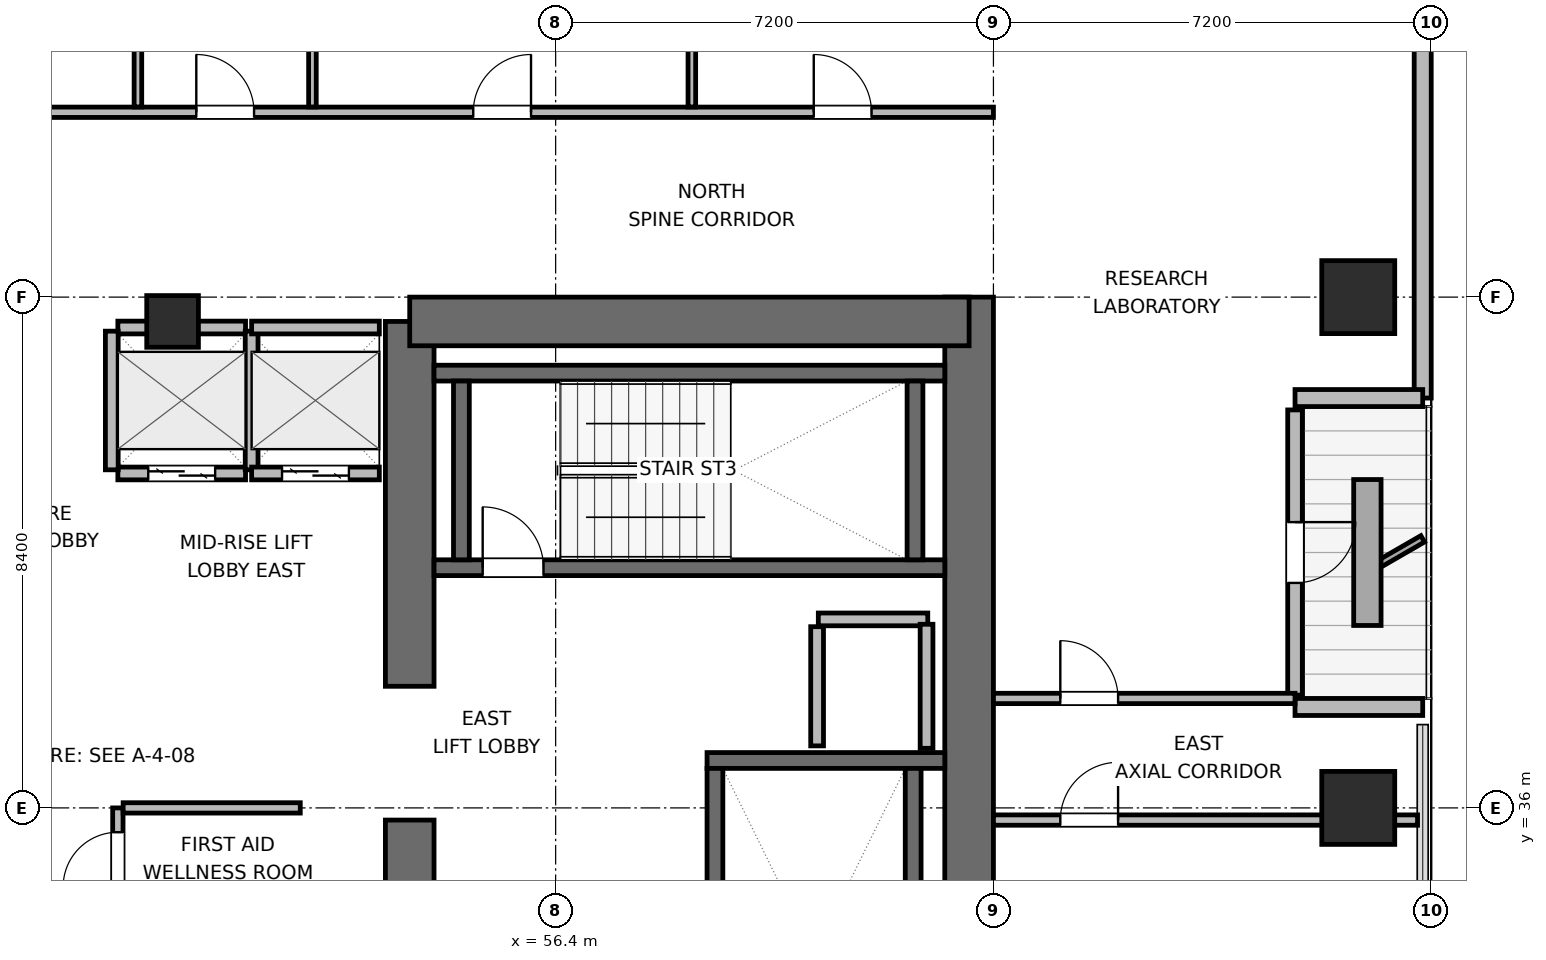
"""IFC4 building model, lengths in metres.
Left out: names, types, materials, properties, quantities, classifications, styles, units other than length and angle.
Written with IfcOpenShell. Run it as: python <this file> out.ifc"""

import sys

from ifc_helpers import new_model, si_unit, direction, frame, frame_2d, origin, origin_2d, place, context, subcontext, project, spatial, rectangle, extrude, element, fill, save


model = new_model("IFC4")
c1 = context("Model", 3, precision=1e-05, world=origin(), true_north=direction((0.0, 1.0)))
c2 = subcontext(c1, "Body", "Model", "MODEL_VIEW")
j1 = project(units=[si_unit("LENGTHUNIT", "METRE"), si_unit("PLANEANGLEUNIT", "RADIAN")], contexts=[c1])
p1 = place(None, origin())
s1 = spatial("IfcSite", under=j1, at=p1, CompositionType="ELEMENT")
p2 = place(p1, origin())
s2 = spatial("IfcBuilding", under=s1, at=p2, CompositionType="ELEMENT")
p3 = place(p2, frame((0.0, 0.0, 174.0)))
s3 = spatial("IfcBuildingStorey", under=s2, at=p3, CompositionType="ELEMENT", Elevation=174.0)
p4 = place(p3, frame((54.0, 28.0, 0.0), z_axis=(0.0, 0.0, 1.0), x_axis=(0.0, 1.0, 0.0)))
e1 = element("IfcWall", 1, at=p4, inside=s3, PredefinedType="SHEAR", context=c2, shape_type="SweptSolid", body=[
    extrude(rectangle(XDim=7.8, YDim=0.8, at=frame_2d((3.9, 0.0))), origin(), (0.0, 0.0, 1.0), 3.9),
])
p5 = place(p3, frame((54.0, 38.0, 0.0), z_axis=(0.0, 0.0, 1.0), x_axis=(0.0, 1.0, 0.0)))
e2 = element("IfcWall", 2, at=p5, inside=s3, PredefinedType="SHEAR", context=c2, shape_type="SweptSolid", body=[
    extrude(rectangle(XDim=6.0, YDim=0.8, at=frame_2d((3.0, 0.0))), origin(), (0.0, 0.0, 1.0), 3.9),
])
p6 = place(p3, frame((63.2, 27.6, 0.0), z_axis=(0.0, 0.0, 1.0), x_axis=(0.0, 1.0, 0.0)))
e3 = element("IfcWall", 3, at=p6, inside=s3, PredefinedType="SHEAR", context=c2, shape_type="SweptSolid", body=[
    extrude(rectangle(XDim=16.8, YDim=0.8, at=frame_2d((8.4, 0.0))), origin(), (0.0, 0.0, 1.0), 3.9),
])
p7 = place(p3, frame((54.0, 44.0, 0.0), z_axis=(0.0, 0.0, 1.0), x_axis=(1.0, 0.0, 0.0)))
e4 = element("IfcWall", 4, at=p7, inside=s3, PredefinedType="SHEAR", context=c2, shape_type="SweptSolid", body=[
    extrude(rectangle(XDim=9.2, YDim=0.8, at=frame_2d((4.6, 0.0))), origin(), (0.0, 0.0, 1.0), 3.9),
])
p8 = place(p3, frame((58.89, 36.78, 0.0), z_axis=(0.0, 0.0, 1.0), x_axis=(1.0, 0.0, 0.0)))
e5 = element("IfcWall", 5, at=p8, inside=s3, PredefinedType="SHEAR", context=c2, shape_type="SweptSolid", body=[
    extrude(rectangle(XDim=3.91, YDim=0.26, at=frame_2d((1.955, 0.0))), origin(), (0.0, 0.0, 1.0), 3.9),
])
p9 = place(p3, frame((59.02, 29.05, 0.0), z_axis=(0.0, 0.0, 1.0), x_axis=(0.0, 1.0, 0.0)))
e6 = element("IfcWall", 6, at=p9, inside=s3, PredefinedType="SHEAR", context=c2, shape_type="SweptSolid", body=[
    extrude(rectangle(XDim=7.6, YDim=0.26, at=frame_2d((3.8, 0.0))), origin(), (0.0, 0.0, 1.0), 3.9),
])
p10 = place(p9, frame((0.3, 0.0, 0.0)))
e7 = element("IfcOpeningElement", 7, at=p10, cuts=e6, PredefinedType="OPENING", context=c2, shape_type="SweptSolid", body=[
    extrude(rectangle(XDim=1.0, YDim=2.04, at=frame_2d((0.5, 1.02))), frame((0.0, 0.14, 0.0), z_axis=(0.0, -1.0, 0.0), x_axis=(1.0, 0.0, 0.0)), (0.0, 0.0, 1.0), 0.28),
])
p11 = place(p3, frame((62.28, 29.05, 0.0), z_axis=(0.0, 0.0, 1.0), x_axis=(0.0, 1.0, 0.0)))
e8 = element("IfcWall", 8, at=p11, inside=s3, PredefinedType="SHEAR", context=c2, shape_type="SweptSolid", body=[
    extrude(rectangle(XDim=7.6, YDim=0.26, at=frame_2d((3.8, 0.0))), origin(), (0.0, 0.0, 1.0), 3.9),
])
p12 = place(p3, frame((54.4, 39.95, 0.0), z_axis=(0.0, 0.0, 1.0), x_axis=(1.0, 0.0, 0.0)))
e9 = element("IfcWall", 9, at=p12, inside=s3, PredefinedType="SHEAR", context=c2, shape_type="SweptSolid", body=[
    extrude(rectangle(XDim=8.4, YDim=0.26, at=frame_2d((4.2, 0.0))), origin(), (0.0, 0.0, 1.0), 3.9),
])
p13 = place(p12, frame((0.8, 0.0, 0.0)))
e10 = element("IfcOpeningElement", 10, at=p13, cuts=e9, PredefinedType="OPENING", context=c2, shape_type="SweptSolid", body=[
    extrude(rectangle(XDim=1.0, YDim=2.04, at=frame_2d((0.5, 1.02))), frame((0.0, 0.14, 0.0), z_axis=(0.0, -1.0, 0.0), x_axis=(1.0, 0.0, 0.0)), (0.0, 0.0, 1.0), 0.28),
])
p14 = place(p3, frame((54.4, 43.15, 0.0), z_axis=(0.0, 0.0, 1.0), x_axis=(1.0, 0.0, 0.0)))
e11 = element("IfcWall", 11, at=p14, inside=s3, PredefinedType="SHEAR", context=c2, shape_type="SweptSolid", body=[
    extrude(rectangle(XDim=8.4, YDim=0.26, at=frame_2d((4.2, 0.0))), origin(), (0.0, 0.0, 1.0), 3.9),
])
for number, where, z_axis, x_axis in (
    (12, (54.85, 40.08, 0.0), (0.0, 0.0, 1.0), (0.0, 1.0, 0.0)),
    (13, (62.31, 40.08, 0.0), (0.0, 0.0, 1.0), (0.0, 1.0, 0.0)),
):
    element("IfcWall", number, at=place(p3, frame(where, z_axis=z_axis, x_axis=x_axis)), inside=s3, PredefinedType="SHEAR", context=c2, shape_type="SweptSolid", body=[
        extrude(rectangle(XDim=2.94, YDim=0.26, at=frame_2d((1.47, 0.0))), origin(), (0.0, 0.0, 1.0), 3.9),
    ])
for number, where, z_axis, x_axis in (
    (14, (69.6, 36.0, 0.0), (0.0, 0.0, 1.0), (1.0, 0.0, 0.0)),
    (15, (69.6, 44.4, 0.0), (0.0, 0.0, 1.0), (1.0, 0.0, 0.0)),
):
    element("IfcColumn", number, at=place(p3, frame(where, z_axis=z_axis, x_axis=x_axis)), inside=s3, PredefinedType="COLUMN", context=c2, shape_type="SweptSolid", body=[
        extrude(rectangle(XDim=1.2, YDim=1.2, at=origin_2d()), origin(), (0.0, 0.0, 1.0), 3.9),
    ])
p15 = place(p3, frame((50.1, 44.0, 0.0), z_axis=(0.0, 0.0, 1.0), x_axis=(1.0, 0.0, 0.0)))
e16 = element("IfcColumn", 16, at=p15, inside=s3, PredefinedType="COLUMN", context=c2, shape_type="SweptSolid", body=[
    extrude(rectangle(XDim=0.85, YDim=0.85, at=origin_2d()), origin(), (0.0, 0.0, 1.0), 3.9),
])
p16 = place(p3, frame((70.66, 56.982, 0.0), z_axis=(0.0, 0.0, 1.0), x_axis=(0.0, -1.0, 0.0)))
e17 = element("IfcWall", 17, at=p16, inside=s3, PredefinedType="SOLIDWALL", context=c2, shape_type="SweptSolid", body=[
    extrude(rectangle(XDim=14.242, YDim=0.28, at=frame_2d((7.121, 0.0))), origin(), (0.0, 0.0, 1.0), 3.68),
])
p17 = place(p3, frame((70.66, 42.74, 0.0), z_axis=(0.0, 0.0, 1.0), x_axis=(-1.0, 0.0, 0.0)))
e18 = element("IfcWall", 18, at=p17, inside=s3, PredefinedType="SOLIDWALL", context=c2, shape_type="SweptSolid", body=[
    extrude(rectangle(XDim=2.1, YDim=0.28, at=frame_2d((1.05, 0.0))), origin(), (0.0, 0.0, 1.0), 3.116),
])
p18 = place(p3, frame((68.56, 42.545, 0.0), z_axis=(0.0, 0.0, 1.0), x_axis=(0.0, -1.0, 0.0)))
e19 = element("IfcWall", 19, at=p18, inside=s3, PredefinedType="SOLIDWALL", context=c2, shape_type="SweptSolid", body=[
    extrude(rectangle(XDim=4.69, YDim=0.24, at=frame_2d((2.345, 0.0))), origin(), (0.0, 0.0, 1.0), 3.248),
])
p19 = place(p18, frame((1.845, 0.0, 0.0)))
e20 = element("IfcOpeningElement", 20, at=p19, cuts=e19, PredefinedType="OPENING", context=c2, shape_type="SweptSolid", body=[
    extrude(rectangle(XDim=1.0, YDim=2.02, at=frame_2d((0.5, 1.01))), frame((0.0, 0.13, 0.0), z_axis=(0.0, -1.0, 0.0), x_axis=(1.0, 0.0, 0.0)), (0.0, 0.0, 1.0), 0.26),
])
p20 = place(p3, frame((68.56, 37.66, 0.0), z_axis=(0.0, 0.0, 1.0), x_axis=(1.0, 0.0, 0.0)))
e21 = element("IfcWall", 21, at=p20, inside=s3, PredefinedType="SOLIDWALL", context=c2, shape_type="SweptSolid", body=[
    extrude(rectangle(XDim=2.1, YDim=0.28, at=frame_2d((1.05, 0.0))), origin(), (0.0, 0.0, 1.0), 3.116),
])
p21 = place(p3, frame((60.72, 39.1, 0.0), z_axis=(0.0, 0.0, 1.0), x_axis=(1.0, 0.0, 0.0)))
e22 = element("IfcWall", 22, at=p21, inside=s3, PredefinedType="PARTITIONING", context=c2, shape_type="SweptSolid", body=[
    extrude(rectangle(XDim=1.8, YDim=0.21, at=frame_2d((0.9, 0.0))), origin(), (0.0, 0.0, 1.0), 3.68),
])
p22 = place(p3, frame((60.7, 37.02, 0.0), z_axis=(0.0, 0.0, 1.0), x_axis=(0.0, 1.0, 0.0)))
e23 = element("IfcWall", 23, at=p22, inside=s3, PredefinedType="PARTITIONING", context=c2, shape_type="SweptSolid", body=[
    extrude(rectangle(XDim=1.96, YDim=0.21, at=frame_2d((0.98, 0.0))), origin(), (0.0, 0.0, 1.0), 3.68),
])
p23 = place(p3, frame((62.5, 36.98, 0.0), z_axis=(0.0, 0.0, 1.0), x_axis=(0.0, 1.0, 0.0)))
e24 = element("IfcWall", 24, at=p23, inside=s3, PredefinedType="PARTITIONING", context=c2, shape_type="SweptSolid", body=[
    extrude(rectangle(XDim=2.04, YDim=0.21, at=frame_2d((1.02, 0.0))), origin(), (0.0, 0.0, 1.0), 3.68),
])
p24 = place(p3, frame((49.2, 41.5, 0.0), z_axis=(0.0, 0.0, 1.0), x_axis=(1.0, 0.0, 0.0)))
e25 = element("IfcWall", 25, at=p24, inside=s3, PredefinedType="PARTITIONING", context=c2, shape_type="SweptSolid", body=[
    extrude(rectangle(XDim=2.1, YDim=0.21, at=frame_2d((1.05, 0.0))), origin(), (0.0, 0.0, 1.0), 3.68),
])
p25 = place(p24, frame((0.5, 0.0, 0.0)))
e26 = element("IfcOpeningElement", 26, at=p25, cuts=e25, PredefinedType="OPENING", context=c2, shape_type="SweptSolid", body=[
    extrude(rectangle(XDim=1.1, YDim=2.04, at=frame_2d((0.55, 1.02))), frame((0.0, 0.115, 0.0), z_axis=(0.0, -1.0, 0.0), x_axis=(1.0, 0.0, 0.0)), (0.0, 0.0, 1.0), 0.23),
])
p26 = place(p3, frame((49.2, 43.9, 0.0), z_axis=(0.0, 0.0, 1.0), x_axis=(1.0, 0.0, 0.0)))
e27 = element("IfcWall", 27, at=p26, inside=s3, PredefinedType="PARTITIONING", context=c2, shape_type="SweptSolid", body=[
    extrude(rectangle(XDim=2.1, YDim=0.21, at=frame_2d((1.05, 0.0))), origin(), (0.0, 0.0, 1.0), 2.765),
])
for number, where, z_axis, x_axis in (
    (28, (49.1, 41.56, 0.0), (0.0, 0.0, 1.0), (0.0, 1.0, 0.0)),
    (29, (51.4, 41.56, 0.0), (0.0, 0.0, 1.0), (0.0, 1.0, 0.0)),
):
    element("IfcWall", number, at=place(p3, frame(where, z_axis=z_axis, x_axis=x_axis)), inside=s3, PredefinedType="PARTITIONING", context=c2, shape_type="SweptSolid", body=[
        extrude(rectangle(XDim=2.28, YDim=0.21, at=frame_2d((1.14, 0.0))), origin(), (0.0, 0.0, 1.0), 3.68),
    ])
p27 = place(p3, frame((51.4, 41.5, 0.0), z_axis=(0.0, 0.0, 1.0), x_axis=(1.0, 0.0, 0.0)))
e30 = element("IfcWall", 30, at=p27, inside=s3, PredefinedType="PARTITIONING", context=c2, shape_type="SweptSolid", body=[
    extrude(rectangle(XDim=2.1, YDim=0.21, at=frame_2d((1.05, 0.0))), origin(), (0.0, 0.0, 1.0), 3.68),
])
p28 = place(p27, frame((0.5, 0.0, 0.0)))
e31 = element("IfcOpeningElement", 31, at=p28, cuts=e30, PredefinedType="OPENING", context=c2, shape_type="SweptSolid", body=[
    extrude(rectangle(XDim=1.1, YDim=2.04, at=frame_2d((0.55, 1.02))), frame((0.0, 0.115, 0.0), z_axis=(0.0, -1.0, 0.0), x_axis=(1.0, 0.0, 0.0)), (0.0, 0.0, 1.0), 0.23),
])
p29 = place(p3, frame((51.4, 43.9, 0.0), z_axis=(0.0, 0.0, 1.0), x_axis=(1.0, 0.0, 0.0)))
e32 = element("IfcWall", 32, at=p29, inside=s3, PredefinedType="PARTITIONING", context=c2, shape_type="SweptSolid", body=[
    extrude(rectangle(XDim=2.1, YDim=0.21, at=frame_2d((1.05, 0.0))), origin(), (0.0, 0.0, 1.0), 2.765),
])
p30 = place(p3, frame((49.2, 32.6, 0.0), z_axis=(0.0, 0.0, 1.0), x_axis=(0.0, 1.0, 0.0)))
e33 = element("IfcWall", 33, at=p30, inside=s3, PredefinedType="PARTITIONING", context=c2, shape_type="SweptSolid", body=[
    extrude(rectangle(XDim=3.4, YDim=0.17, at=frame_2d((1.7, 0.0))), origin(), (0.0, 0.0, 1.0), 3.68),
])
p31 = place(p30, frame((0.4, 0.0, 0.0)))
e34 = element("IfcOpeningElement", 34, at=p31, cuts=e33, PredefinedType="OPENING", context=c2, shape_type="SweptSolid", body=[
    extrude(rectangle(XDim=0.9, YDim=2.02, at=frame_2d((0.45, 1.01))), frame((0.0, 0.095, 0.0), z_axis=(0.0, -1.0, 0.0), x_axis=(1.0, 0.0, 0.0)), (0.0, 0.0, 1.0), 0.19),
])
p32 = place(p30, frame((2.1, 0.0, 0.0)))
e35 = element("IfcOpeningElement", 35, at=p32, cuts=e33, PredefinedType="OPENING", context=c2, shape_type="SweptSolid", body=[
    extrude(rectangle(XDim=0.9, YDim=2.02, at=frame_2d((0.45, 1.01))), frame((0.0, 0.095, 0.0), z_axis=(0.0, -1.0, 0.0), x_axis=(1.0, 0.0, 0.0)), (0.0, 0.0, 1.0), 0.19),
])
p33 = place(p3, frame((49.287, 36.0, 0.0), z_axis=(0.0, 0.0, 1.0), x_axis=(1.0, 0.0, 0.0)))
e36 = element("IfcWall", 36, at=p33, inside=s3, PredefinedType="PARTITIONING", context=c2, shape_type="SweptSolid", body=[
    extrude(rectangle(XDim=2.913, YDim=0.17, at=frame_2d((1.457, 0.0))), origin(), (0.0, 0.0, 1.0), 3.68),
])
p34 = place(p3, frame((29.525, 47.44, 0.0), z_axis=(0.0, 0.0, 1.0), x_axis=(1.0, 0.0, 0.0)))
e37 = element("IfcWall", 37, at=p34, inside=s3, PredefinedType="PARTITIONING", context=c2, shape_type="SweptSolid", body=[
    extrude(rectangle(XDim=34.075, YDim=0.17, at=frame_2d((17.038, 0.0))), origin(), (0.0, 0.0, 1.0), 3.68),
])
p35 = place(p34, frame((1.217, 0.0, 0.0)))
e38 = element("IfcOpeningElement", 38, at=p35, cuts=e37, PredefinedType="OPENING", context=c2, shape_type="SweptSolid", body=[
    extrude(rectangle(XDim=0.95, YDim=2.04, at=frame_2d((0.475, 1.02))), frame((0.0, 0.095, 0.0), z_axis=(0.0, -1.0, 0.0), x_axis=(1.0, 0.0, 0.0)), (0.0, 0.0, 1.0), 0.19),
])
p36 = place(p34, frame((6.37, 0.0, 0.0)))
e39 = element("IfcOpeningElement", 39, at=p36, cuts=e37, PredefinedType="OPENING", context=c2, shape_type="SweptSolid", body=[
    extrude(rectangle(XDim=0.95, YDim=2.04, at=frame_2d((0.475, 1.02))), frame((0.0, 0.095, 0.0), z_axis=(0.0, -1.0, 0.0), x_axis=(1.0, 0.0, 0.0)), (0.0, 0.0, 1.0), 0.19),
])
p37 = place(p34, frame((12.01, 0.0, 0.0)))
e40 = element("IfcOpeningElement", 40, at=p37, cuts=e37, PredefinedType="OPENING", context=c2, shape_type="SweptSolid", body=[
    extrude(rectangle(XDim=0.95, YDim=2.04, at=frame_2d((0.475, 1.02))), frame((0.0, 0.095, 0.0), z_axis=(0.0, -1.0, 0.0), x_axis=(1.0, 0.0, 0.0)), (0.0, 0.0, 1.0), 0.19),
])
p38 = place(p34, frame((16.86, 0.0, 0.0)))
e41 = element("IfcOpeningElement", 41, at=p38, cuts=e37, PredefinedType="OPENING", context=c2, shape_type="SweptSolid", body=[
    extrude(rectangle(XDim=0.95, YDim=2.04, at=frame_2d((0.475, 1.02))), frame((0.0, 0.095, 0.0), z_axis=(0.0, -1.0, 0.0), x_axis=(1.0, 0.0, 0.0)), (0.0, 0.0, 1.0), 0.19),
])
p39 = place(p34, frame((20.965, 0.0, 0.0)))
e42 = element("IfcOpeningElement", 42, at=p39, cuts=e37, PredefinedType="OPENING", context=c2, shape_type="SweptSolid", body=[
    extrude(rectangle(XDim=0.95, YDim=2.04, at=frame_2d((0.475, 1.02))), frame((0.0, 0.095, 0.0), z_axis=(0.0, -1.0, 0.0), x_axis=(1.0, 0.0, 0.0)), (0.0, 0.0, 1.0), 0.19),
])
p40 = place(p34, frame((25.52, 0.0, 0.0)))
e43 = element("IfcOpeningElement", 43, at=p40, cuts=e37, PredefinedType="OPENING", context=c2, shape_type="SweptSolid", body=[
    extrude(rectangle(XDim=0.95, YDim=2.04, at=frame_2d((0.475, 1.02))), frame((0.0, 0.095, 0.0), z_axis=(0.0, -1.0, 0.0), x_axis=(1.0, 0.0, 0.0)), (0.0, 0.0, 1.0), 0.19),
])
p41 = place(p34, frame((31.12, 0.0, 0.0)))
e44 = element("IfcOpeningElement", 44, at=p41, cuts=e37, PredefinedType="OPENING", context=c2, shape_type="SweptSolid", body=[
    extrude(rectangle(XDim=0.95, YDim=2.04, at=frame_2d((0.475, 1.02))), frame((0.0, 0.095, 0.0), z_axis=(0.0, -1.0, 0.0), x_axis=(1.0, 0.0, 0.0)), (0.0, 0.0, 1.0), 0.19),
])
p42 = place(p3, frame((49.53, 47.527, 0.0), z_axis=(0.0, 0.0, 1.0), x_axis=(0.0, 1.0, 0.0)))
e45 = element("IfcWall", 45, at=p42, inside=s3, PredefinedType="PARTITIONING", context=c2, shape_type="SweptSolid", body=[
    extrude(rectangle(XDim=10.918, YDim=0.125, at=frame_2d((5.459, 0.0))), origin(), (0.0, 0.0, 1.0), 3.68),
])
p43 = place(p3, frame((52.4, 47.527, 0.0), z_axis=(0.0, 0.0, 1.0), x_axis=(0.0, 1.0, 0.0)))
e46 = element("IfcWall", 46, at=p43, inside=s3, PredefinedType="PARTITIONING", context=c2, shape_type="SweptSolid", body=[
    extrude(rectangle(XDim=10.918, YDim=0.125, at=frame_2d((5.459, 0.0))), origin(), (0.0, 0.0, 1.0), 3.043),
])
p44 = place(p3, frame((58.64, 47.527, 0.0), z_axis=(0.0, 0.0, 1.0), x_axis=(0.0, 1.0, 0.0)))
e47 = element("IfcWall", 47, at=p44, inside=s3, PredefinedType="PARTITIONING", context=c2, shape_type="SweptSolid", body=[
    extrude(rectangle(XDim=14.598, YDim=0.125, at=frame_2d((7.299, 0.0))), origin(), (0.0, 0.0, 1.0), 3.68),
])
p45 = place(p3, frame((63.6, 35.8, 0.0), z_axis=(0.0, 0.0, 1.0), x_axis=(1.0, 0.0, 0.0)))
e48 = element("IfcWall", 48, at=p45, inside=s3, PredefinedType="PARTITIONING", context=c2, shape_type="SweptSolid", body=[
    extrude(rectangle(XDim=6.975, YDim=0.17, at=frame_2d((3.487, 0.0))), origin(), (0.0, 0.0, 1.0), 3.043),
])
p46 = place(p45, frame((1.1, 0.0, 0.0)))
e49 = element("IfcOpeningElement", 49, at=p46, cuts=e48, PredefinedType="OPENING", context=c2, shape_type="SweptSolid", body=[
    extrude(rectangle(XDim=0.95, YDim=2.04, at=frame_2d((0.475, 1.02))), frame((0.0, 0.095, 0.0), z_axis=(0.0, -1.0, 0.0), x_axis=(1.0, 0.0, 0.0)), (0.0, 0.0, 1.0), 0.19),
])
p47 = place(p3, frame((63.6, 37.8, 0.0), z_axis=(0.0, 0.0, 1.0), x_axis=(1.0, 0.0, 0.0)))
e50 = element("IfcWall", 50, at=p47, inside=s3, PredefinedType="PARTITIONING", context=c2, shape_type="SweptSolid", body=[
    extrude(rectangle(XDim=4.96, YDim=0.17, at=frame_2d((2.48, 0.0))), origin(), (0.0, 0.0, 1.0), 3.68),
])
p48 = place(p47, frame((1.1, 0.0, 0.0)))
e51 = element("IfcOpeningElement", 51, at=p48, cuts=e50, PredefinedType="OPENING", context=c2, shape_type="SweptSolid", body=[
    extrude(rectangle(XDim=0.95, YDim=2.04, at=frame_2d((0.475, 1.02))), frame((0.0, 0.095, 0.0), z_axis=(0.0, -1.0, 0.0), x_axis=(1.0, 0.0, 0.0)), (0.0, 0.0, 1.0), 0.19),
])
p49 = place(p19, origin())
e52 = element("IfcDoor", 52, at=p49, inside=s3, OperationType="SINGLE_SWING_LEFT", PredefinedType="DOOR", context=c2, shape_type="SweptSolid", body=[
    extrude(rectangle(XDim=1.0, YDim=2.02, at=frame_2d((0.5, 1.01))), frame((0.0, 0.025, 0.0), z_axis=(0.0, -1.0, 0.0), x_axis=(1.0, 0.0, 0.0)), (0.0, 0.0, 1.0), 0.05),
])
fill(e20, e52)
p50 = place(p13, origin())
e53 = element("IfcDoor", 53, at=p50, inside=s3, OperationType="SINGLE_SWING_LEFT", PredefinedType="DOOR", context=c2, shape_type="SweptSolid", body=[
    extrude(rectangle(XDim=1.0, YDim=2.04, at=frame_2d((0.5, 1.02))), frame((0.0, 0.025, 0.0), z_axis=(0.0, -1.0, 0.0), x_axis=(1.0, 0.0, 0.0)), (0.0, 0.0, 1.0), 0.05),
])
fill(e10, e53)
p51 = place(p25, origin())
e54 = element("IfcDoor", 54, at=p51, inside=s3, OperationType="DOUBLE_DOOR_SLIDING", PredefinedType="DOOR", context=c2, shape_type="SweptSolid", body=[
    extrude(rectangle(XDim=1.1, YDim=2.04, at=frame_2d((0.55, 1.02))), frame((0.0, 0.025, 0.0), z_axis=(0.0, -1.0, 0.0), x_axis=(1.0, 0.0, 0.0)), (0.0, 0.0, 1.0), 0.05),
])
fill(e26, e54)
p52 = place(p28, origin())
e55 = element("IfcDoor", 55, at=p52, inside=s3, OperationType="DOUBLE_DOOR_SLIDING", PredefinedType="DOOR", context=c2, shape_type="SweptSolid", body=[
    extrude(rectangle(XDim=1.1, YDim=2.04, at=frame_2d((0.55, 1.02))), frame((0.0, 0.025, 0.0), z_axis=(0.0, -1.0, 0.0), x_axis=(1.0, 0.0, 0.0)), (0.0, 0.0, 1.0), 0.05),
])
fill(e31, e55)
p53 = place(p32, origin())
e56 = element("IfcDoor", 56, at=p53, inside=s3, OperationType="SINGLE_SWING_LEFT", PredefinedType="DOOR", context=c2, shape_type="SweptSolid", body=[
    extrude(rectangle(XDim=0.9, YDim=2.02, at=frame_2d((0.45, 1.01))), frame((0.0, 0.025, 0.0), z_axis=(0.0, -1.0, 0.0), x_axis=(1.0, 0.0, 0.0)), (0.0, 0.0, 1.0), 0.05),
])
fill(e35, e56)
p54 = place(p39, origin())
e57 = element("IfcDoor", 57, at=p54, inside=s3, OperationType="SINGLE_SWING_LEFT", PredefinedType="DOOR", context=c2, shape_type="SweptSolid", body=[
    extrude(rectangle(XDim=0.95, YDim=2.04, at=frame_2d((0.475, 1.02))), frame((0.0, 0.025, 0.0), z_axis=(0.0, -1.0, 0.0), x_axis=(1.0, 0.0, 0.0)), (0.0, 0.0, 1.0), 0.05),
])
fill(e42, e57)
p55 = place(p40, origin())
e58 = element("IfcDoor", 58, at=p55, inside=s3, OperationType="SINGLE_SWING_RIGHT", PredefinedType="DOOR", context=c2, shape_type="SweptSolid", body=[
    extrude(rectangle(XDim=0.95, YDim=2.04, at=frame_2d((0.475, 1.02))), frame((0.0, 0.025, 0.0), z_axis=(0.0, -1.0, 0.0), x_axis=(1.0, 0.0, 0.0)), (0.0, 0.0, 1.0), 0.05),
])
fill(e43, e58)
p56 = place(p41, origin())
e59 = element("IfcDoor", 59, at=p56, inside=s3, OperationType="SINGLE_SWING_LEFT", PredefinedType="DOOR", context=c2, shape_type="SweptSolid", body=[
    extrude(rectangle(XDim=0.95, YDim=2.04, at=frame_2d((0.475, 1.02))), frame((0.0, 0.025, 0.0), z_axis=(0.0, -1.0, 0.0), x_axis=(1.0, 0.0, 0.0)), (0.0, 0.0, 1.0), 0.05),
])
fill(e44, e59)
p57 = place(p46, origin())
e60 = element("IfcDoor", 60, at=p57, inside=s3, OperationType="SINGLE_SWING_RIGHT", PredefinedType="DOOR", context=c2, shape_type="SweptSolid", body=[
    extrude(rectangle(XDim=0.95, YDim=2.04, at=frame_2d((0.475, 1.02))), frame((0.0, 0.025, 0.0), z_axis=(0.0, -1.0, 0.0), x_axis=(1.0, 0.0, 0.0)), (0.0, 0.0, 1.0), 0.05),
])
fill(e49, e60)
p58 = place(p48, origin())
e61 = element("IfcDoor", 61, at=p58, inside=s3, OperationType="SINGLE_SWING_LEFT", PredefinedType="DOOR", context=c2, shape_type="SweptSolid", body=[
    extrude(rectangle(XDim=0.95, YDim=2.04, at=frame_2d((0.475, 1.02))), frame((0.0, 0.025, 0.0), z_axis=(0.0, -1.0, 0.0), x_axis=(1.0, 0.0, 0.0)), (0.0, 0.0, 1.0), 0.05),
])
fill(e51, e61)
save(model, sys.argv[1])
